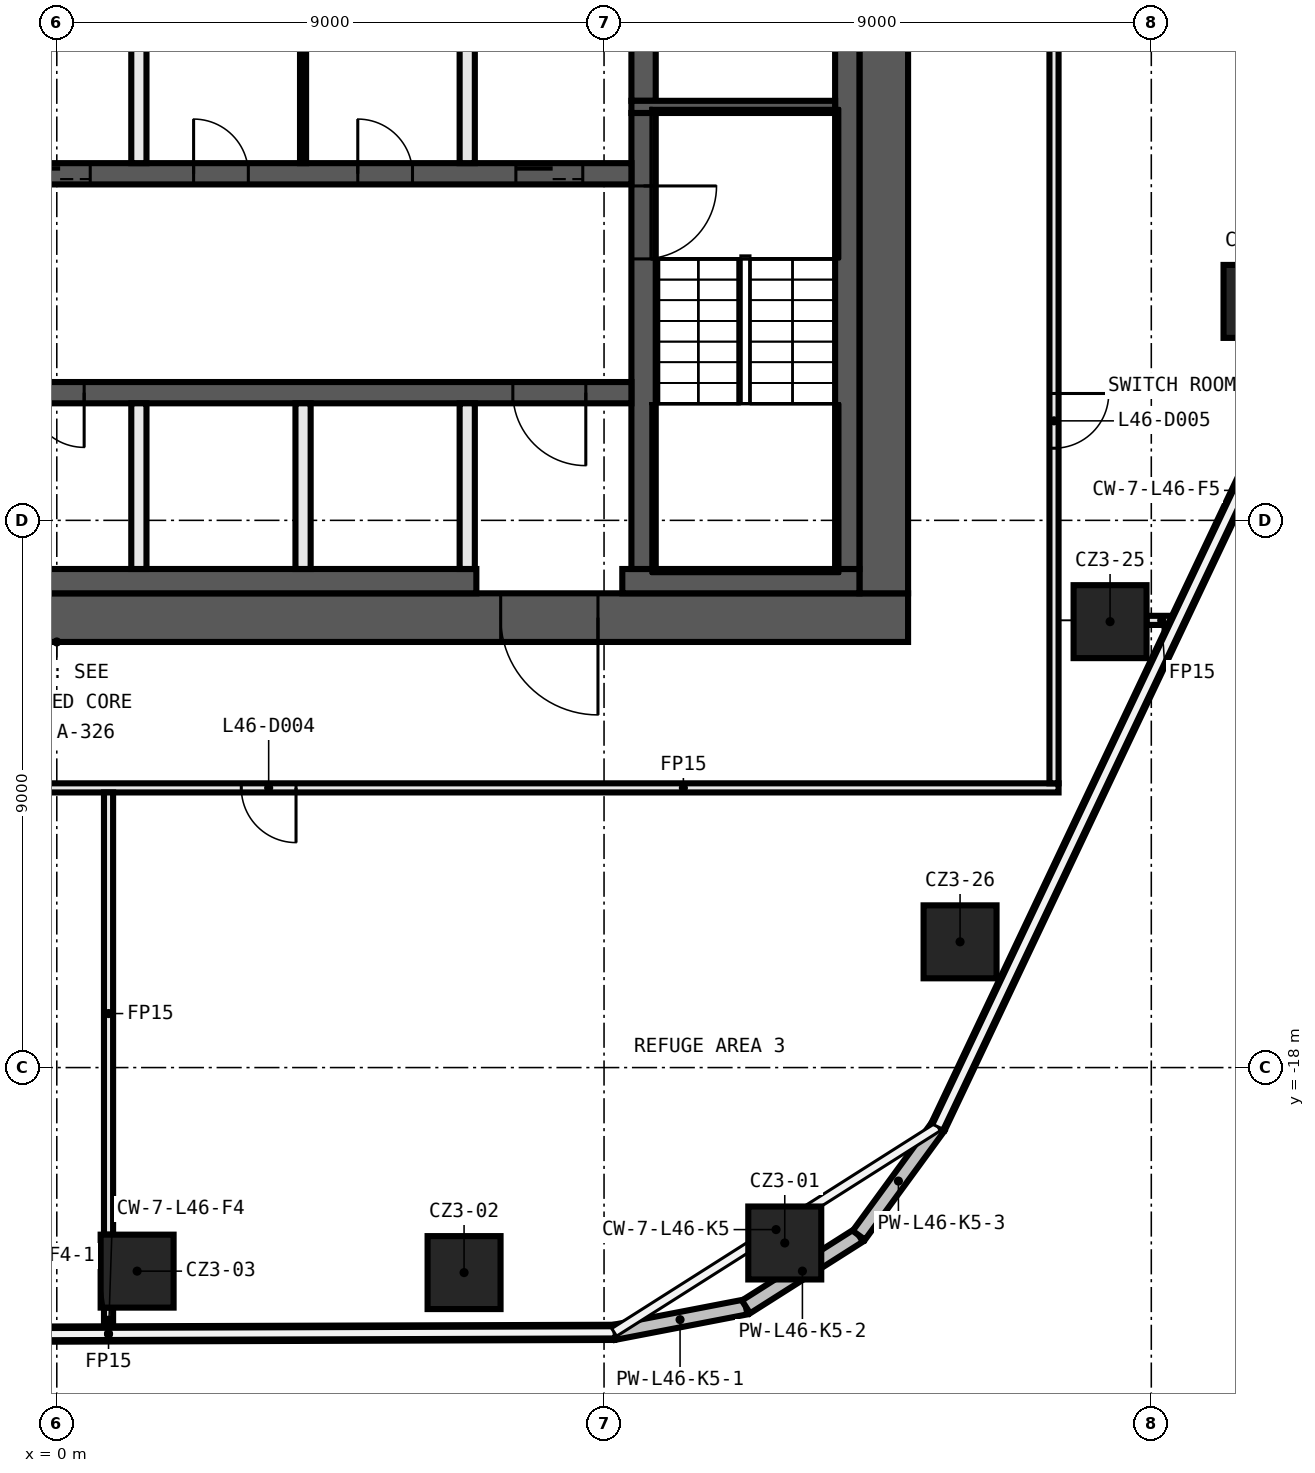
"""IFC4 building model, lengths in metres.
Left out: names, types, materials, properties, quantities, classifications, styles, units other than length and angle.
Written with IfcOpenShell. Run it as: python <this file> out.ifc"""

import sys

from ifc_helpers import new_model, si_unit, direction, frame, frame_2d, origin, origin_2d, place, context, subcontext, project, spatial, rectangle, extrude, element, fill, save


model = new_model("IFC4")
c1 = context("Model", 3, precision=1e-05, world=origin(), true_north=direction((0.0, 1.0)))
c2 = subcontext(c1, "Body", "Model", "MODEL_VIEW")
j1 = project(units=[si_unit("LENGTHUNIT", "METRE"), si_unit("PLANEANGLEUNIT", "RADIAN")], contexts=[c1])
p1 = place(None, origin())
s1 = spatial("IfcSite", under=j1, at=p1, CompositionType="ELEMENT")
p2 = place(p1, origin())
s2 = spatial("IfcBuilding", under=s1, at=p2, CompositionType="ELEMENT")
p3 = place(p2, frame((0.0, 0.0, 220.6)))
s3 = spatial("IfcBuildingStorey", under=s2, at=p3, CompositionType="ELEMENT", Elevation=220.6)
for number, where, z_axis, x_axis in (
    (1, (11.972, -20.885, 0.0), (0.0, 0.0, 1.0), (1.0, 0.0, 0.0)),
    (2, (6.698, -21.372, 0.0), (0.0, 0.0, 1.0), (1.0, 0.0, 0.0)),
    (3, (1.321, -21.348, 0.0), (0.0, 0.0, 1.0), (1.0, 0.0, 0.0)),
    (4, (19.788, -5.399, 0.0), (0.0, 0.0, 1.0), (1.0, 0.0, 0.0)),
    (5, (17.322, -10.666, 0.0), (0.0, 0.0, 1.0), (1.0, 0.0, 0.0)),
    (6, (14.855, -15.932, 0.0), (0.0, 0.0, 1.0), (1.0, 0.0, 0.0)),
):
    element("IfcColumn", number, at=place(p3, frame(where, z_axis=z_axis, x_axis=x_axis)), inside=s3, PredefinedType="COLUMN", context=c2, shape_type="SweptSolid", body=[
        extrude(rectangle(XDim=1.2, YDim=1.2, at=origin_2d()), origin(), (0.0, 0.0, 1.0), 7.55),
    ])
p4 = place(p3, frame((16.475, -13.4, 0.0), z_axis=(0.0, 0.0, 1.0), x_axis=(-1.0, 0.0, 0.0)))
e7 = element("IfcWall", 7, at=p4, inside=s3, PredefinedType="PARTITIONING", context=c2, shape_type="SweptSolid", body=[
    extrude(rectangle(XDim=32.95, YDim=0.15, at=frame_2d((16.475, 0.0))), origin(), (0.0, 0.0, 1.0), 7.55),
])
p5 = place(p4, frame((28.298, 0.0, 0.0)))
e8 = element("IfcOpeningElement", 8, at=p5, cuts=e7, PredefinedType="OPENING", context=c2, shape_type="SweptSolid", body=[
    extrude(rectangle(XDim=0.9, YDim=2.1, at=frame_2d((0.45, 1.05))), frame((0.0, 0.085, 0.0), z_axis=(0.0, -1.0, 0.0), x_axis=(1.0, 0.0, 0.0)), (0.0, 0.0, 1.0), 0.17),
])
p6 = place(p4, frame((20.59, 0.0, 0.0)))
e9 = element("IfcOpeningElement", 9, at=p6, cuts=e7, PredefinedType="OPENING", context=c2, shape_type="SweptSolid", body=[
    extrude(rectangle(XDim=0.9, YDim=2.1, at=frame_2d((0.45, 1.05))), frame((0.0, 0.085, 0.0), z_axis=(0.0, -1.0, 0.0), x_axis=(1.0, 0.0, 0.0)), (0.0, 0.0, 1.0), 0.17),
])
p7 = place(p4, frame((12.541, 0.0, 0.0)))
e10 = element("IfcOpeningElement", 10, at=p7, cuts=e7, PredefinedType="OPENING", context=c2, shape_type="SweptSolid", body=[
    extrude(rectangle(XDim=0.9, YDim=2.1, at=frame_2d((0.45, 1.05))), frame((0.0, 0.085, 0.0), z_axis=(0.0, -1.0, 0.0), x_axis=(1.0, 0.0, 0.0)), (0.0, 0.0, 1.0), 0.17),
])
p8 = place(p3, frame((17.922, -10.645, 0.0), z_axis=(0.0, 0.0, 1.0), x_axis=(1.0, 0.0, 0.0)))
e11 = element("IfcWall", 11, at=p8, inside=s3, PredefinedType="PARTITIONING", context=c2, shape_type="SweptSolid", body=[
    extrude(rectangle(XDim=0.499, YDim=0.15, at=frame_2d((0.249, 0.0))), origin(), (0.0, 0.0, 1.0), 7.55),
])
p9 = place(p3, frame((16.4, 13.325, 0.0), z_axis=(0.0, 0.0, 1.0), x_axis=(0.0, -1.0, 0.0)))
e12 = element("IfcWall", 12, at=p9, inside=s3, PredefinedType="PARTITIONING", context=c2, shape_type="SweptSolid", body=[
    extrude(rectangle(XDim=26.65, YDim=0.15, at=frame_2d((13.325, 0.0))), origin(), (0.0, 0.0, 1.0), 7.55),
])
p10 = place(p9, frame((20.239, 0.0, 0.0)))
e13 = element("IfcOpeningElement", 13, at=p10, cuts=e12, PredefinedType="OPENING", context=c2, shape_type="SweptSolid", body=[
    extrude(rectangle(XDim=0.9, YDim=2.1, at=frame_2d((0.45, 1.05))), frame((0.0, 0.085, 0.0), z_axis=(0.0, -1.0, 0.0), x_axis=(1.0, 0.0, 0.0)), (0.0, 0.0, 1.0), 0.17),
])
p11 = place(p9, frame((2.668, 0.0, 0.0)))
e14 = element("IfcOpeningElement", 14, at=p11, cuts=e12, PredefinedType="OPENING", context=c2, shape_type="SweptSolid", body=[
    extrude(rectangle(XDim=0.9, YDim=2.1, at=frame_2d((0.45, 1.05))), frame((0.0, 0.085, 0.0), z_axis=(0.0, -1.0, 0.0), x_axis=(1.0, 0.0, 0.0)), (0.0, 0.0, 1.0), 0.17),
])
p12 = place(p3, frame((0.851, -22.361, 0.0), z_axis=(0.0, 0.0, 1.0), x_axis=(0.0, 1.0, 0.0)))
e15 = element("IfcWall", 15, at=p12, inside=s3, PredefinedType="PARTITIONING", context=c2, shape_type="SweptSolid", body=[
    extrude(rectangle(XDim=0.413, YDim=0.15, at=frame_2d((0.206, 0.0))), origin(), (0.0, 0.0, 1.0), 7.55),
])
p13 = place(p3, frame((0.851, -20.748, 0.0), z_axis=(0.0, 0.0, 1.0), x_axis=(0.0, 1.0, 0.0)))
e16 = element("IfcWall", 16, at=p13, inside=s3, PredefinedType="PARTITIONING", context=c2, shape_type="SweptSolid", body=[
    extrude(rectangle(XDim=7.273, YDim=0.15, at=frame_2d((3.636, 0.0))), origin(), (0.0, 0.0, 1.0), 7.55),
])
p14 = place(p3, frame((-7.465, -22.406, 0.0), z_axis=(0.0, 0.0, 1.0), x_axis=(0.999995157281, 0.003112139949, 0.0)))
e17 = element("IfcWall", 17, at=p14, inside=s3, PredefinedType="SOLIDWALL", context=c2, shape_type="SweptSolid", body=[
    extrude(rectangle(XDim=16.631, YDim=0.25, at=frame_2d((8.315, 0.0))), origin(), (0.0, 0.0, 1.0), 7.55),
])
p15 = place(p3, frame((9.166, -22.355, 0.0), z_axis=(0.0, 0.0, 1.0), x_axis=(0.981897444966, 0.189413324688, 0.0)))
e18 = element("IfcWall", 18, at=p15, inside=s3, PredefinedType="SOLIDWALL", context=c2, shape_type="SweptSolid", body=[
    extrude(rectangle(XDim=2.208, YDim=0.25, at=frame_2d((1.104, 0.0))), origin(), (0.0, 0.0, 1.0), 7.55),
])
p16 = place(p3, frame((11.334, -21.937, 0.0), z_axis=(0.0, 0.0, 1.0), x_axis=(0.844360333602, 0.53577572457, 0.0)))
e19 = element("IfcWall", 19, at=p16, inside=s3, PredefinedType="SOLIDWALL", context=c2, shape_type="SweptSolid", body=[
    extrude(rectangle(XDim=2.199, YDim=0.25, at=frame_2d((1.099, 0.0))), origin(), (0.0, 0.0, 1.0), 7.55),
])
p17 = place(p3, frame((13.19, -20.759, 0.0), z_axis=(0.0, 0.0, 1.0), x_axis=(0.589439820184, 0.807812291552, 0.0)))
e20 = element("IfcWall", 20, at=p17, inside=s3, PredefinedType="SOLIDWALL", context=c2, shape_type="SweptSolid", body=[
    extrude(rectangle(XDim=2.208, YDim=0.25, at=frame_2d((1.104, 0.0))), origin(), (0.0, 0.0, 1.0), 7.55),
])
p18 = place(p3, frame((14.492, -18.975, 0.0), z_axis=(0.0, 0.0, 1.0), x_axis=(0.428543737813, 0.903521037265, 0.0)))
e21 = element("IfcWall", 21, at=p18, inside=s3, PredefinedType="SOLIDWALL", context=c2, shape_type="SweptSolid", body=[
    extrude(rectangle(XDim=23.171, YDim=0.25, at=frame_2d((11.586, 0.0))), origin(), (0.0, 0.0, 1.0), 7.55),
])
p19 = place(p3, frame((14.0, -10.6, 0.0), z_axis=(0.0, 0.0, 1.0), x_axis=(-1.0, 0.0, 0.0)))
e22 = element("IfcWall", 22, at=p19, inside=s3, PredefinedType="SHEAR", context=c2, shape_type="SweptSolid", body=[
    extrude(rectangle(XDim=28.0, YDim=0.8, at=frame_2d((14.0, 0.0))), origin(), (0.0, 0.0, 1.0), 7.55),
])
p20 = place(p19, frame((5.1, 0.0, 0.0)))
e23 = element("IfcOpeningElement", 23, at=p20, cuts=e22, PredefinedType="OPENING", context=c2, shape_type="SweptSolid", body=[
    extrude(rectangle(XDim=1.6, YDim=2.1, at=frame_2d((0.8, 1.05))), frame((0.0, 0.41, 0.0), z_axis=(0.0, -1.0, 0.0), x_axis=(1.0, 0.0, 0.0)), (0.0, 0.0, 1.0), 0.82),
])
p21 = place(p3, frame((13.6, 10.2, 0.0), z_axis=(0.0, 0.0, 1.0), x_axis=(0.0, -1.0, 0.0)))
e24 = element("IfcWall", 24, at=p21, inside=s3, PredefinedType="SHEAR", context=c2, shape_type="SweptSolid", body=[
    extrude(rectangle(XDim=20.4, YDim=0.8, at=frame_2d((10.2, 0.0))), origin(), (0.0, 0.0, 1.0), 7.55),
])
p22 = place(p3, frame((13.2, -10.0, 0.0), z_axis=(0.0, 0.0, 1.0), x_axis=(-1.0, 0.0, 0.0)))
e25 = element("IfcWall", 25, at=p22, inside=s3, PredefinedType="SHEAR", context=c2, shape_type="SweptSolid", body=[
    extrude(rectangle(XDim=3.9, YDim=0.4, at=frame_2d((1.95, 0.0))), origin(), (0.0, 0.0, 1.0), 7.55),
])
p23 = place(p3, frame((6.9, -10.0, 0.0), z_axis=(0.0, 0.0, 1.0), x_axis=(-1.0, 0.0, 0.0)))
e26 = element("IfcWall", 26, at=p23, inside=s3, PredefinedType="SHEAR", context=c2, shape_type="SweptSolid", body=[
    extrude(rectangle(XDim=20.1, YDim=0.4, at=frame_2d((10.05, 0.0))), origin(), (0.0, 0.0, 1.0), 7.55),
])
p24 = place(p3, frame((13.0, 9.8, 0.0), z_axis=(0.0, 0.0, 1.0), x_axis=(0.0, -1.0, 0.0)))
e27 = element("IfcWall", 27, at=p24, inside=s3, PredefinedType="SHEAR", context=c2, shape_type="SweptSolid", body=[
    extrude(rectangle(XDim=19.6, YDim=0.4, at=frame_2d((9.8, 0.0))), origin(), (0.0, 0.0, 1.0), 7.55),
])
p25 = place(p3, frame((9.65, -2.3, 0.0), z_axis=(0.0, 0.0, 1.0), x_axis=(0.0, -1.0, 0.0)))
e28 = element("IfcWall", 28, at=p25, inside=s3, PredefinedType="SHEAR", context=c2, shape_type="SweptSolid", body=[
    extrude(rectangle(XDim=7.5, YDim=0.4, at=frame_2d((3.75, 0.0))), origin(), (0.0, 0.0, 1.0), 7.55),
])
p26 = place(p25, frame((1.2, 0.0, 0.0)))
e29 = element("IfcOpeningElement", 29, at=p26, cuts=e28, PredefinedType="OPENING", context=c2, shape_type="SweptSolid", body=[
    extrude(rectangle(XDim=1.2, YDim=2.1, at=frame_2d((0.6, 1.05))), frame((0.0, 0.21, 0.0), z_axis=(0.0, -1.0, 0.0), x_axis=(1.0, 0.0, 0.0)), (0.0, 0.0, 1.0), 0.42),
])
p27 = place(p3, frame((9.65, 2.1, 0.0), z_axis=(0.0, 0.0, 1.0), x_axis=(0.0, -1.0, 0.0)))
e30 = element("IfcWall", 30, at=p27, inside=s3, PredefinedType="SHEAR", context=c2, shape_type="SweptSolid", body=[
    extrude(rectangle(XDim=4.2, YDim=0.4, at=frame_2d((2.1, 0.0))), origin(), (0.0, 0.0, 1.0), 7.55),
])
p28 = place(p27, frame((0.15, 0.0, 0.0)))
e31 = element("IfcOpeningElement", 31, at=p28, cuts=e30, PredefinedType="OPENING", context=c2, shape_type="SweptSolid", body=[
    extrude(rectangle(XDim=0.9, YDim=2.1, at=frame_2d((0.45, 1.05))), frame((0.0, 0.21, 0.0), z_axis=(0.0, -1.0, 0.0), x_axis=(1.0, 0.0, 0.0)), (0.0, 0.0, 1.0), 0.42),
])
p29 = place(p3, frame((9.45, -2.2, 0.0), z_axis=(0.0, 0.0, 1.0), x_axis=(1.0, 0.0, 0.0)))
e32 = element("IfcWall", 32, at=p29, inside=s3, PredefinedType="SHEAR", context=c2, shape_type="SweptSolid", body=[
    extrude(rectangle(XDim=3.35, YDim=0.2, at=frame_2d((1.675, 0.0))), origin(), (0.0, 0.0, 1.0), 7.55),
])
p30 = place(p3, frame((-9.45, -3.3, 0.0), z_axis=(0.0, 0.0, 1.0), x_axis=(1.0, 0.0, 0.0)))
e33 = element("IfcWall", 33, at=p30, inside=s3, PredefinedType="SHEAR", context=c2, shape_type="SweptSolid", body=[
    extrude(rectangle(XDim=18.9, YDim=0.35, at=frame_2d((9.45, 0.0))), origin(), (0.0, 0.0, 1.0), 7.55),
])
p31 = place(p30, frame((0.8, 0.0, 0.0)))
e34 = element("IfcOpeningElement", 34, at=p31, cuts=e33, PredefinedType="OPENING", context=c2, shape_type="SweptSolid", body=[
    extrude(rectangle(XDim=1.1, YDim=2.1, at=frame_2d((0.55, 1.05))), frame((0.0, 0.185, 0.0), z_axis=(0.0, -1.0, 0.0), x_axis=(1.0, 0.0, 0.0)), (0.0, 0.0, 1.0), 0.37),
])
p32 = place(p30, frame((3.5, 0.0, 0.0)))
e35 = element("IfcOpeningElement", 35, at=p32, cuts=e33, PredefinedType="OPENING", context=c2, shape_type="SweptSolid", body=[
    extrude(rectangle(XDim=1.1, YDim=2.1, at=frame_2d((0.55, 1.05))), frame((0.0, 0.185, 0.0), z_axis=(0.0, -1.0, 0.0), x_axis=(1.0, 0.0, 0.0)), (0.0, 0.0, 1.0), 0.37),
])
p33 = place(p30, frame((6.2, 0.0, 0.0)))
e36 = element("IfcOpeningElement", 36, at=p33, cuts=e33, PredefinedType="OPENING", context=c2, shape_type="SweptSolid", body=[
    extrude(rectangle(XDim=1.1, YDim=2.1, at=frame_2d((0.55, 1.05))), frame((0.0, 0.185, 0.0), z_axis=(0.0, -1.0, 0.0), x_axis=(1.0, 0.0, 0.0)), (0.0, 0.0, 1.0), 0.37),
])
p34 = place(p30, frame((8.9, 0.0, 0.0)))
e37 = element("IfcOpeningElement", 37, at=p34, cuts=e33, PredefinedType="OPENING", context=c2, shape_type="SweptSolid", body=[
    extrude(rectangle(XDim=1.1, YDim=2.1, at=frame_2d((0.55, 1.05))), frame((0.0, 0.185, 0.0), z_axis=(0.0, -1.0, 0.0), x_axis=(1.0, 0.0, 0.0)), (0.0, 0.0, 1.0), 0.37),
])
p35 = place(p30, frame((17.0, 0.0, 0.0)))
e38 = element("IfcOpeningElement", 38, at=p35, cuts=e33, PredefinedType="OPENING", context=c2, shape_type="SweptSolid", body=[
    extrude(rectangle(XDim=1.1, YDim=2.1, at=frame_2d((0.55, 1.05))), frame((0.0, 0.185, 0.0), z_axis=(0.0, -1.0, 0.0), x_axis=(1.0, 0.0, 0.0)), (0.0, 0.0, 1.0), 0.37),
])
p36 = place(p30, frame((11.7, 0.0, 0.0)))
e39 = element("IfcOpeningElement", 39, at=p36, cuts=e33, PredefinedType="OPENING", context=c2, shape_type="SweptSolid", body=[
    extrude(rectangle(XDim=0.9, YDim=2.1, at=frame_2d((0.45, 1.05))), frame((0.0, 0.185, 0.0), z_axis=(0.0, -1.0, 0.0), x_axis=(1.0, 0.0, 0.0)), (0.0, 0.0, 1.0), 0.37),
])
p37 = place(p30, frame((14.4, 0.0, 0.0)))
e40 = element("IfcOpeningElement", 40, at=p37, cuts=e33, PredefinedType="OPENING", context=c2, shape_type="SweptSolid", body=[
    extrude(rectangle(XDim=0.9, YDim=2.1, at=frame_2d((0.45, 1.05))), frame((0.0, 0.185, 0.0), z_axis=(0.0, -1.0, 0.0), x_axis=(1.0, 0.0, 0.0)), (0.0, 0.0, 1.0), 0.37),
])
p38 = place(p3, frame((9.45, -6.9, 0.0), z_axis=(0.0, 0.0, 1.0), x_axis=(-1.0, 0.0, 0.0)))
e41 = element("IfcWall", 41, at=p38, inside=s3, PredefinedType="SHEAR", context=c2, shape_type="SweptSolid", body=[
    extrude(rectangle(XDim=18.9, YDim=0.35, at=frame_2d((9.45, 0.0))), origin(), (0.0, 0.0, 1.0), 7.55),
])
p39 = place(p38, frame((0.75, 0.0, 0.0)))
e42 = element("IfcOpeningElement", 42, at=p39, cuts=e41, PredefinedType="OPENING", context=c2, shape_type="SweptSolid", body=[
    extrude(rectangle(XDim=1.2, YDim=2.1, at=frame_2d((0.6, 1.05))), frame((0.0, 0.185, 0.0), z_axis=(0.0, -1.0, 0.0), x_axis=(1.0, 0.0, 0.0)), (0.0, 0.0, 1.0), 0.37),
])
p40 = place(p38, frame((15.75, 0.0, 0.0)))
e43 = element("IfcOpeningElement", 43, at=p40, cuts=e41, PredefinedType="OPENING", context=c2, shape_type="SweptSolid", body=[
    extrude(rectangle(XDim=0.9, YDim=2.1, at=frame_2d((0.45, 1.05))), frame((0.0, 0.185, 0.0), z_axis=(0.0, -1.0, 0.0), x_axis=(1.0, 0.0, 0.0)), (0.0, 0.0, 1.0), 0.37),
])
p41 = place(p38, frame((11.7, 0.0, 0.0)))
e44 = element("IfcOpeningElement", 44, at=p41, cuts=e41, PredefinedType="OPENING", context=c2, shape_type="SweptSolid", body=[
    extrude(rectangle(XDim=0.9, YDim=2.1, at=frame_2d((0.45, 1.05))), frame((0.0, 0.185, 0.0), z_axis=(0.0, -1.0, 0.0), x_axis=(1.0, 0.0, 0.0)), (0.0, 0.0, 1.0), 0.37),
])
p42 = place(p38, frame((9.0, 0.0, 0.0)))
e45 = element("IfcOpeningElement", 45, at=p42, cuts=e41, PredefinedType="OPENING", context=c2, shape_type="SweptSolid", body=[
    extrude(rectangle(XDim=0.9, YDim=2.1, at=frame_2d((0.45, 1.05))), frame((0.0, 0.185, 0.0), z_axis=(0.0, -1.0, 0.0), x_axis=(1.0, 0.0, 0.0)), (0.0, 0.0, 1.0), 0.37),
])
for number, where, z_axis, x_axis in (
    (46, (6.75, -9.8, 0.0), (0.0, 0.0, 1.0), (0.0, 1.0, 0.0)),
    (47, (6.75, -3.125, 0.0), (0.0, 0.0, 1.0), (0.0, 1.0, 0.0)),
):
    element("IfcWall", number, at=place(p3, frame(where, z_axis=z_axis, x_axis=x_axis)), inside=s3, PredefinedType="SOLIDWALL", context=c2, shape_type="SweptSolid", body=[
        extrude(rectangle(XDim=2.725, YDim=0.25, at=frame_2d((1.363, 0.0))), origin(), (0.0, 0.0, 1.0), 7.55),
    ])
p43 = place(p3, frame((4.05, -3.125, 0.0), z_axis=(0.0, 0.0, 1.0), x_axis=(0.0, 1.0, 0.0)))
e48 = element("IfcWall", 48, at=p43, inside=s3, PredefinedType="PARTITIONING", context=c2, shape_type="SweptSolid", body=[
    extrude(rectangle(XDim=2.725, YDim=0.1, at=frame_2d((1.363, 0.0))), origin(), (0.0, 0.0, 1.0), 7.55),
])
for number, where, z_axis, x_axis in (
    (49, (4.05, -9.8, 0.0), (0.0, 0.0, 1.0), (0.0, 1.0, 0.0)),
    (50, (1.35, -9.8, 0.0), (0.0, 0.0, 1.0), (0.0, 1.0, 0.0)),
    (51, (1.35, -3.125, 0.0), (0.0, 0.0, 1.0), (0.0, 1.0, 0.0)),
):
    element("IfcWall", number, at=place(p3, frame(where, z_axis=z_axis, x_axis=x_axis)), inside=s3, PredefinedType="SOLIDWALL", context=c2, shape_type="SweptSolid", body=[
        extrude(rectangle(XDim=2.725, YDim=0.25, at=frame_2d((1.363, 0.0))), origin(), (0.0, 0.0, 1.0), 7.55),
    ])
p44 = place(p7, origin())
e52 = element("IfcDoor", 52, at=p44, inside=s3, OperationType="SINGLE_SWING_LEFT", PredefinedType="DOOR", context=c2, shape_type="SweptSolid", body=[
    extrude(rectangle(XDim=0.9, YDim=2.1, at=frame_2d((0.45, 1.05))), frame((0.0, 0.025, 0.0), z_axis=(0.0, -1.0, 0.0), x_axis=(1.0, 0.0, 0.0)), (0.0, 0.0, 1.0), 0.05),
])
fill(e10, e52)
p45 = place(p10, origin())
e53 = element("IfcDoor", 53, at=p45, inside=s3, OperationType="SINGLE_SWING_RIGHT", PredefinedType="DOOR", context=c2, shape_type="SweptSolid", body=[
    extrude(rectangle(XDim=0.9, YDim=2.1, at=frame_2d((0.45, 1.05))), frame((0.0, 0.025, 0.0), z_axis=(0.0, -1.0, 0.0), x_axis=(1.0, 0.0, 0.0)), (0.0, 0.0, 1.0), 0.05),
])
fill(e13, e53)
p46 = place(p34, origin())
e54 = element("IfcDoor", 54, at=p46, inside=s3, OperationType="DOUBLE_DOOR_SLIDING", PredefinedType="DOOR", context=c2, shape_type="SweptSolid", body=[
    extrude(rectangle(XDim=1.1, YDim=2.1, at=frame_2d((0.55, 1.05))), frame((0.0, 0.025, 0.0), z_axis=(0.0, -1.0, 0.0), x_axis=(1.0, 0.0, 0.0)), (0.0, 0.0, 1.0), 0.05),
])
fill(e37, e54)
p47 = place(p35, origin())
e55 = element("IfcDoor", 55, at=p47, inside=s3, OperationType="DOUBLE_DOOR_SLIDING", PredefinedType="DOOR", context=c2, shape_type="SweptSolid", body=[
    extrude(rectangle(XDim=1.1, YDim=2.1, at=frame_2d((0.55, 1.05))), frame((0.0, 0.025, 0.0), z_axis=(0.0, -1.0, 0.0), x_axis=(1.0, 0.0, 0.0)), (0.0, 0.0, 1.0), 0.05),
])
fill(e38, e55)
p48 = place(p20, origin())
e56 = element("IfcDoor", 56, at=p48, inside=s3, OperationType="DOUBLE_DOOR_SINGLE_SWING", PredefinedType="DOOR", context=c2, shape_type="SweptSolid", body=[
    extrude(rectangle(XDim=1.6, YDim=2.1, at=frame_2d((0.8, 1.05))), frame((0.0, 0.025, 0.0), z_axis=(0.0, -1.0, 0.0), x_axis=(1.0, 0.0, 0.0)), (0.0, 0.0, 1.0), 0.05),
])
fill(e23, e56)
p49 = place(p39, origin())
e57 = element("IfcDoor", 57, at=p49, inside=s3, OperationType="SINGLE_SWING_LEFT", PredefinedType="DOOR", context=c2, shape_type="SweptSolid", body=[
    extrude(rectangle(XDim=1.2, YDim=2.1, at=frame_2d((0.6, 1.05))), frame((0.0, 0.025, 0.0), z_axis=(0.0, -1.0, 0.0), x_axis=(1.0, 0.0, 0.0)), (0.0, 0.0, 1.0), 0.05),
])
fill(e42, e57)
p50 = place(p36, origin())
e58 = element("IfcDoor", 58, at=p50, inside=s3, OperationType="SINGLE_SWING_LEFT", PredefinedType="DOOR", context=c2, shape_type="SweptSolid", body=[
    extrude(rectangle(XDim=0.9, YDim=2.1, at=frame_2d((0.45, 1.05))), frame((0.0, 0.025, 0.0), z_axis=(0.0, -1.0, 0.0), x_axis=(1.0, 0.0, 0.0)), (0.0, 0.0, 1.0), 0.05),
])
fill(e39, e58)
p51 = place(p37, origin())
e59 = element("IfcDoor", 59, at=p51, inside=s3, OperationType="SINGLE_SWING_RIGHT", PredefinedType="DOOR", context=c2, shape_type="SweptSolid", body=[
    extrude(rectangle(XDim=0.9, YDim=2.1, at=frame_2d((0.45, 1.05))), frame((0.0, 0.025, 0.0), z_axis=(0.0, -1.0, 0.0), x_axis=(1.0, 0.0, 0.0)), (0.0, 0.0, 1.0), 0.05),
])
fill(e40, e59)
p52 = place(p42, origin())
e60 = element("IfcDoor", 60, at=p52, inside=s3, OperationType="SINGLE_SWING_LEFT", PredefinedType="DOOR", context=c2, shape_type="SweptSolid", body=[
    extrude(rectangle(XDim=0.9, YDim=2.1, at=frame_2d((0.45, 1.05))), frame((0.0, 0.025, 0.0), z_axis=(0.0, -1.0, 0.0), x_axis=(1.0, 0.0, 0.0)), (0.0, 0.0, 1.0), 0.05),
])
fill(e45, e60)
p53 = place(p26, origin())
e61 = element("IfcDoor", 61, at=p53, inside=s3, OperationType="SINGLE_SWING_RIGHT", PredefinedType="DOOR", context=c2, shape_type="SweptSolid", body=[
    extrude(rectangle(XDim=1.2, YDim=2.1, at=frame_2d((0.6, 1.05))), frame((0.0, 0.025, 0.0), z_axis=(0.0, -1.0, 0.0), x_axis=(1.0, 0.0, 0.0)), (0.0, 0.0, 1.0), 0.05),
])
fill(e29, e61)
save(model, sys.argv[1])
